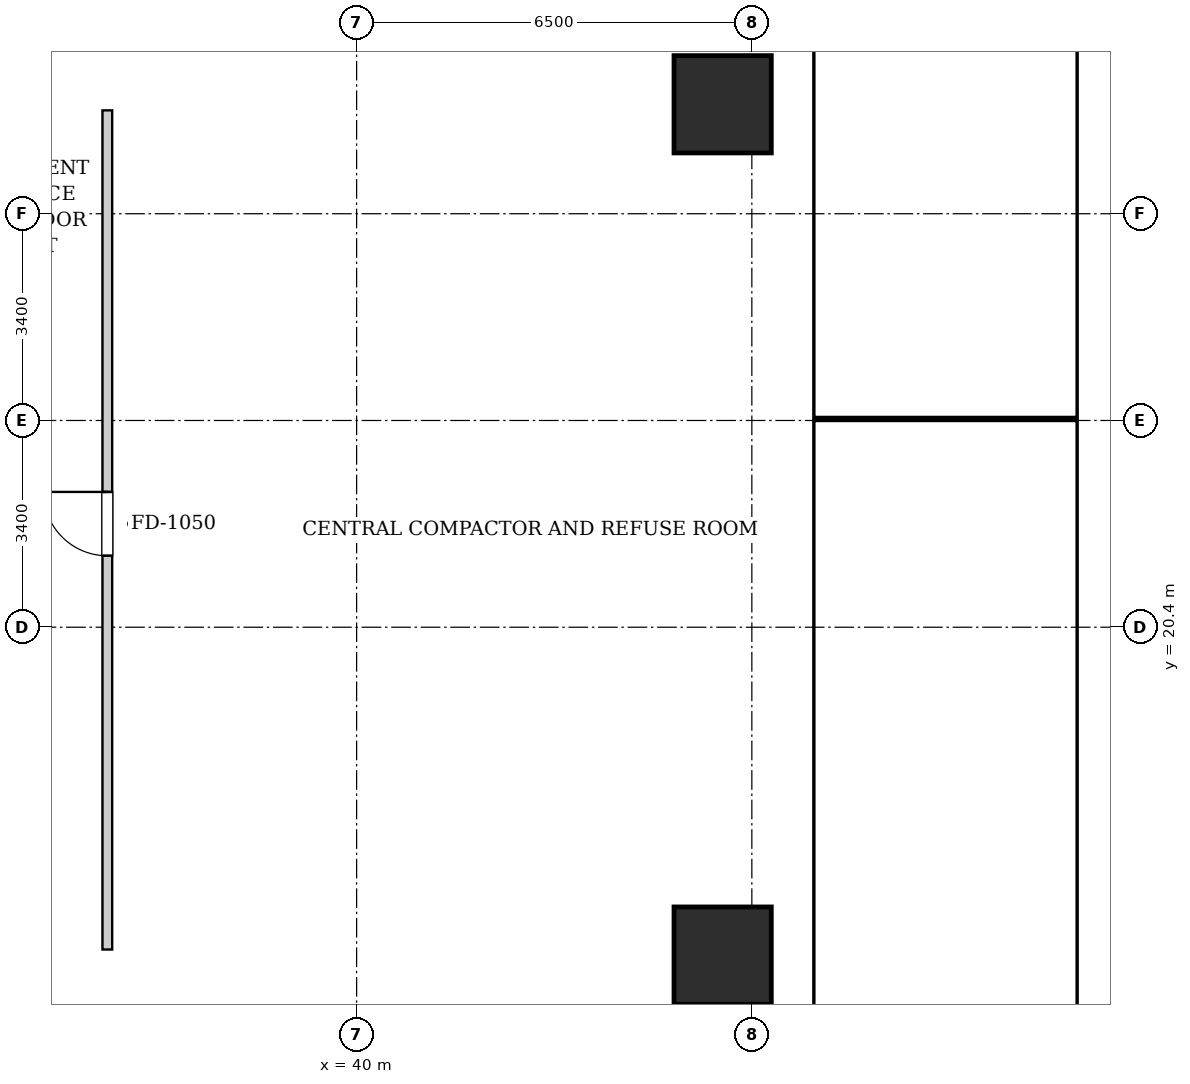
"""IFC4 building model, lengths in metres.
Left out: names, types, materials, properties, quantities, classifications, styles, units other than length and angle.
Written with IfcOpenShell. Run it as: python <this file> out.ifc"""

import sys

from ifc_helpers import new_model, si_unit, direction, frame, frame_2d, origin, origin_2d, place, context, subcontext, project, spatial, rectangle, extrude, element, fill, save


model = new_model("IFC4")
c1 = context("Model", 3, precision=1e-05, world=origin(), true_north=direction((0.0, 1.0)))
c2 = subcontext(c1, "Body", "Model", "MODEL_VIEW")
j1 = project(units=[si_unit("LENGTHUNIT", "METRE"), si_unit("PLANEANGLEUNIT", "RADIAN")], contexts=[c1])
p1 = place(None, origin())
s1 = spatial("IfcSite", under=j1, at=p1, CompositionType="ELEMENT")
p2 = place(p1, origin())
s2 = spatial("IfcBuilding", under=s1, at=p2, CompositionType="ELEMENT")
p3 = place(p2, frame((0.0, 0.0, -9.6)))
s3 = spatial("IfcBuildingStorey", under=s2, at=p3, CompositionType="ELEMENT", Elevation=-9.6)
for number, where, z_axis, x_axis in (
    (1, (46.02, 15.0, 0.0), (0.0, 0.0, 1.0), (1.0, 0.0, 0.0)),
    (2, (46.02, 29.0, 0.0), (0.0, 0.0, 1.0), (1.0, 0.0, 0.0)),
):
    element("IfcColumn", number, at=place(p3, frame(where, z_axis=z_axis, x_axis=x_axis)), inside=s3, PredefinedType="COLUMN", context=c2, shape_type="SweptSolid", body=[
        extrude(rectangle(XDim=1.6, YDim=1.6, at=origin_2d()), origin(), (0.0, 0.0, 1.0), 4.8),
    ])
p4 = place(p3, frame((35.9, 15.1, 0.0), z_axis=(0.0, 0.0, 1.0), x_axis=(0.0, 1.0, 0.0)))
e3 = element("IfcWall", 3, at=p4, inside=s3, PredefinedType="PARTITIONING", context=c2, shape_type="SweptSolid", body=[
    extrude(rectangle(XDim=13.8, YDim=0.16, at=frame_2d((6.9, 0.0))), origin(), (0.0, 0.0, 1.0), 4.48),
])
p5 = place(p4, frame((6.475, 0.0, 0.0)))
e4 = element("IfcOpeningElement", 4, at=p5, cuts=e3, PredefinedType="OPENING", context=c2, shape_type="SweptSolid", body=[
    extrude(rectangle(XDim=1.05, YDim=2.05, at=frame_2d((0.525, 1.025))), frame((0.0, 0.09, 0.0), z_axis=(0.0, -1.0, 0.0), x_axis=(1.0, 0.0, 0.0)), (0.0, 0.0, 1.0), 0.18),
])
p6 = place(p5, origin())
e5 = element("IfcDoor", 5, at=p6, inside=s3, OperationType="SINGLE_SWING_RIGHT", PredefinedType="DOOR", context=c2, shape_type="SweptSolid", body=[
    extrude(rectangle(XDim=1.05, YDim=2.05, at=frame_2d((0.525, 1.025))), frame((0.0, 0.025, 0.0), z_axis=(0.0, -1.0, 0.0), x_axis=(1.0, 0.0, 0.0)), (0.0, 0.0, 1.0), 0.05),
])
fill(e4, e5)
save(model, sys.argv[1])
